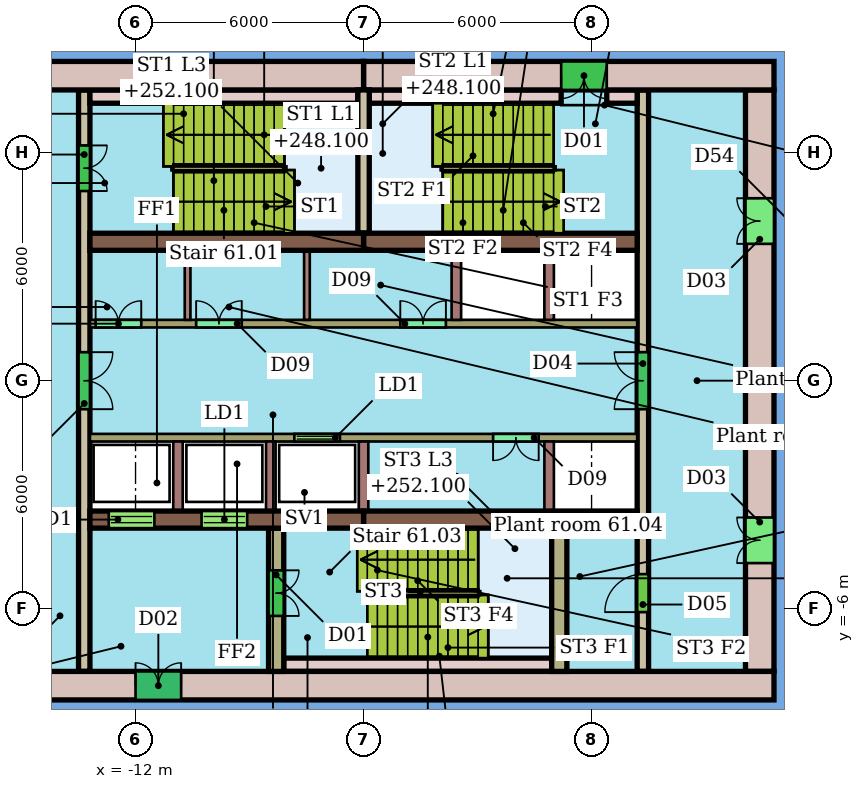
"""IFC4 building model, lengths in metres.
Left out: names, types, materials, properties, quantities, classifications, styles, units other than length and angle.
Written with IfcOpenShell. Run it as: python <this file> out.ifc"""

import sys

from ifc_helpers import new_model, si_unit, direction, frame, frame_2d, origin, place, context, subcontext, project, spatial, rectangle, extrude, element, fill, save


model = new_model("IFC4")
c1 = context("Model", 3, precision=1e-05, world=origin(), true_north=direction((0.0, 1.0)))
c2 = subcontext(c1, "Body", "Model", "MODEL_VIEW")
j1 = project(units=[si_unit("LENGTHUNIT", "METRE"), si_unit("PLANEANGLEUNIT", "RADIAN")], contexts=[c1])
p1 = place(None, origin())
s1 = spatial("IfcSite", under=j1, at=p1, CompositionType="ELEMENT")
p2 = place(p1, origin())
s2 = spatial("IfcBuilding", under=s1, at=p2, CompositionType="ELEMENT")
p3 = place(p2, frame((0.0, 0.0, 246.1)))
s3 = spatial("IfcBuildingStorey", under=s2, at=p3, CompositionType="ELEMENT", Elevation=246.1)
p4 = place(p3, frame((4.8, 8.025, 0.0), z_axis=(0.0, 0.0, 1.0), x_axis=(-1.0, 0.0, 0.0)))
e1 = element("IfcWall", 1, at=p4, inside=s3, PredefinedType="SHEAR", context=c2, shape_type="SweptSolid", body=[
    extrude(rectangle(XDim=10.8, YDim=0.75, at=frame_2d((5.4, 0.0))), origin(), (0.0, 0.0, 1.0), 7.55),
])
p5 = place(p4, frame((4.4, 0.0, 0.0)))
e2 = element("IfcOpeningElement", 2, at=p5, cuts=e1, PredefinedType="OPENING", context=c2, shape_type="SweptSolid", body=[
    extrude(rectangle(XDim=1.2, YDim=2.1, at=frame_2d((0.6, 1.05))), frame((0.0, 0.385, 0.0), z_axis=(0.0, -1.0, 0.0), x_axis=(1.0, 0.0, 0.0)), (0.0, 0.0, 1.0), 0.77),
])
p6 = place(p3, frame((-6.0, 8.025, 0.0), z_axis=(0.0, 0.0, 1.0), x_axis=(-1.0, 0.0, 0.0)))
e3 = element("IfcWall", 3, at=p6, inside=s3, PredefinedType="SHEAR", context=c2, shape_type="SweptSolid", body=[
    extrude(rectangle(XDim=10.8, YDim=0.75, at=frame_2d((5.4, 0.0))), origin(), (0.0, 0.0, 1.0), 7.55),
])
p7 = place(p3, frame((-16.8, -8.025, 0.0), z_axis=(0.0, 0.0, 1.0), x_axis=(1.0, 0.0, 0.0)))
e4 = element("IfcWall", 4, at=p7, inside=s3, PredefinedType="SHEAR", context=c2, shape_type="SweptSolid", body=[
    extrude(rectangle(XDim=21.6, YDim=0.75, at=frame_2d((10.8, 0.0))), origin(), (0.0, 0.0, 1.0), 7.55),
])
p8 = place(p7, frame((4.8, 0.0, 0.0)))
e5 = element("IfcOpeningElement", 5, at=p8, cuts=e4, PredefinedType="OPENING", context=c2, shape_type="SweptSolid", body=[
    extrude(rectangle(XDim=1.2, YDim=2.1, at=frame_2d((0.6, 1.05))), frame((0.0, 0.385, 0.0), z_axis=(0.0, -1.0, 0.0), x_axis=(1.0, 0.0, 0.0)), (0.0, 0.0, 1.0), 0.77),
])
p9 = place(p3, frame((4.425, -7.65, 0.0), z_axis=(0.0, 0.0, 1.0), x_axis=(0.0, 1.0, 0.0)))
e6 = element("IfcWall", 6, at=p9, inside=s3, PredefinedType="SHEAR", context=c2, shape_type="SweptSolid", body=[
    extrude(rectangle(XDim=15.3, YDim=0.75, at=frame_2d((7.65, 0.0))), origin(), (0.0, 0.0, 1.0), 7.55),
])
p10 = place(p9, frame((2.85, 0.0, 0.0)))
e7 = element("IfcOpeningElement", 7, at=p10, cuts=e6, PredefinedType="OPENING", context=c2, shape_type="SweptSolid", body=[
    extrude(rectangle(XDim=1.2, YDim=2.1, at=frame_2d((0.6, 1.05))), frame((0.0, 0.385, 0.0), z_axis=(0.0, -1.0, 0.0), x_axis=(1.0, 0.0, 0.0)), (0.0, 0.0, 1.0), 0.77),
])
p11 = place(p9, frame((11.25, 0.0, 0.0)))
e8 = element("IfcOpeningElement", 8, at=p11, cuts=e6, PredefinedType="OPENING", context=c2, shape_type="SweptSolid", body=[
    extrude(rectangle(XDim=1.2, YDim=2.1, at=frame_2d((0.6, 1.05))), frame((0.0, 0.385, 0.0), z_axis=(0.0, -1.0, 0.0), x_axis=(1.0, 0.0, 0.0)), (0.0, 0.0, 1.0), 0.77),
])
for number, where, z_axis, x_axis in (
    (9, (-13.2, 3.655, 0.0), (0.0, 0.0, 1.0), (1.0, 0.0, 0.0)),
    (10, (-6.0, 3.655, 0.0), (0.0, 0.0, 1.0), (1.0, 0.0, 0.0)),
):
    element("IfcWall", number, at=place(p3, frame(where, z_axis=z_axis, x_axis=x_axis)), inside=s3, PredefinedType="SHEAR", context=c2, shape_type="SweptSolid", body=[
        extrude(rectangle(XDim=7.2, YDim=0.45, at=frame_2d((3.6, 0.0))), origin(), (0.0, 0.0, 1.0), 7.55),
    ])
p12 = place(p3, frame((-13.2, -3.655, 0.0), z_axis=(0.0, 0.0, 1.0), x_axis=(1.0, 0.0, 0.0)))
e11 = element("IfcWall", 11, at=p12, inside=s3, PredefinedType="SHEAR", context=c2, shape_type="SweptSolid", body=[
    extrude(rectangle(XDim=7.2, YDim=0.45, at=frame_2d((3.6, 0.0))), origin(), (0.0, 0.0, 1.0), 7.55),
])
p13 = place(p12, frame((0.496, 0.0, 0.0)))
e12 = element("IfcOpeningElement", 12, at=p13, cuts=e11, PredefinedType="OPENING", context=c2, shape_type="SweptSolid", body=[
    extrude(rectangle(XDim=1.2, YDim=2.1, at=frame_2d((0.6, 1.05))), frame((0.0, 0.235, 0.0), z_axis=(0.0, -1.0, 0.0), x_axis=(1.0, 0.0, 0.0)), (0.0, 0.0, 1.0), 0.47),
])
p14 = place(p12, frame((2.938, 0.0, 0.0)))
e13 = element("IfcOpeningElement", 13, at=p14, cuts=e11, PredefinedType="OPENING", context=c2, shape_type="SweptSolid", body=[
    extrude(rectangle(XDim=1.2, YDim=2.1, at=frame_2d((0.6, 1.05))), frame((0.0, 0.235, 0.0), z_axis=(0.0, -1.0, 0.0), x_axis=(1.0, 0.0, 0.0)), (0.0, 0.0, 1.0), 0.47),
])
p15 = place(p3, frame((-6.0, -3.655, 0.0), z_axis=(0.0, 0.0, 1.0), x_axis=(1.0, 0.0, 0.0)))
e14 = element("IfcWall", 14, at=p15, inside=s3, PredefinedType="SHEAR", context=c2, shape_type="SweptSolid", body=[
    extrude(rectangle(XDim=7.2, YDim=0.45, at=frame_2d((3.6, 0.0))), origin(), (0.0, 0.0, 1.0), 7.55),
])
p16 = place(p3, frame((-13.35, 7.65, 0.0), z_axis=(0.0, 0.0, 1.0), x_axis=(0.0, -1.0, 0.0)))
e15 = element("IfcWall", 15, at=p16, inside=s3, PredefinedType="SHEAR", context=c2, shape_type="SweptSolid", body=[
    extrude(rectangle(XDim=15.3, YDim=0.3, at=frame_2d((7.65, 0.0))), origin(), (0.0, 0.0, 1.0), 7.55),
])
p17 = place(p16, frame((1.46, 0.0, 0.0)))
e16 = element("IfcOpeningElement", 16, at=p17, cuts=e15, PredefinedType="OPENING", context=c2, shape_type="SweptSolid", body=[
    extrude(rectangle(XDim=1.2, YDim=2.1, at=frame_2d((0.6, 1.05))), frame((0.0, 0.16, 0.0), z_axis=(0.0, -1.0, 0.0), x_axis=(1.0, 0.0, 0.0)), (0.0, 0.0, 1.0), 0.32),
])
p18 = place(p16, frame((6.9, 0.0, 0.0)))
e17 = element("IfcOpeningElement", 17, at=p18, cuts=e15, PredefinedType="OPENING", context=c2, shape_type="SweptSolid", body=[
    extrude(rectangle(XDim=1.5, YDim=2.1, at=frame_2d((0.75, 1.05))), frame((0.0, 0.16, 0.0), z_axis=(0.0, -1.0, 0.0), x_axis=(1.0, 0.0, 0.0)), (0.0, 0.0, 1.0), 0.32),
])
p19 = place(p3, frame((1.35, -7.65, 0.0), z_axis=(0.0, 0.0, 1.0), x_axis=(0.0, 1.0, 0.0)))
e18 = element("IfcWall", 18, at=p19, inside=s3, PredefinedType="SHEAR", context=c2, shape_type="SweptSolid", body=[
    extrude(rectangle(XDim=15.3, YDim=0.3, at=frame_2d((7.65, 0.0))), origin(), (0.0, 0.0, 1.0), 7.55),
])
p20 = place(p19, frame((1.56, 0.0, 0.0)))
e19 = element("IfcOpeningElement", 19, at=p20, cuts=e18, PredefinedType="OPENING", context=c2, shape_type="SweptSolid", body=[
    extrude(rectangle(XDim=1.0, YDim=2.1, at=frame_2d((0.5, 1.05))), frame((0.0, 0.16, 0.0), z_axis=(0.0, -1.0, 0.0), x_axis=(1.0, 0.0, 0.0)), (0.0, 0.0, 1.0), 0.32),
])
p21 = place(p19, frame((6.9, 0.0, 0.0)))
e20 = element("IfcOpeningElement", 20, at=p21, cuts=e18, PredefinedType="OPENING", context=c2, shape_type="SweptSolid", body=[
    extrude(rectangle(XDim=1.5, YDim=2.1, at=frame_2d((0.75, 1.05))), frame((0.0, 0.16, 0.0), z_axis=(0.0, -1.0, 0.0), x_axis=(1.0, 0.0, 0.0)), (0.0, 0.0, 1.0), 0.32),
])
p22 = place(p3, frame((-13.2, 1.5, 0.0), z_axis=(0.0, 0.0, 1.0), x_axis=(1.0, 0.0, 0.0)))
e21 = element("IfcWall", 21, at=p22, inside=s3, PredefinedType="SHEAR", context=c2, shape_type="SweptSolid", body=[
    extrude(rectangle(XDim=14.4, YDim=0.2, at=frame_2d((7.2, 0.0))), origin(), (0.0, 0.0, 1.0), 7.55),
])
p23 = place(p22, frame((0.15, 0.0, 0.0)))
e22 = element("IfcOpeningElement", 22, at=p23, cuts=e21, PredefinedType="OPENING", context=c2, shape_type="SweptSolid", body=[
    extrude(rectangle(XDim=1.2, YDim=2.4, at=frame_2d((0.6, 1.2))), frame((0.0, 0.11, 0.0), z_axis=(0.0, -1.0, 0.0), x_axis=(1.0, 0.0, 0.0)), (0.0, 0.0, 1.0), 0.22),
])
p24 = place(p22, frame((2.794, 0.0, 0.0)))
e23 = element("IfcOpeningElement", 23, at=p24, cuts=e21, PredefinedType="OPENING", context=c2, shape_type="SweptSolid", body=[
    extrude(rectangle(XDim=1.2, YDim=2.4, at=frame_2d((0.6, 1.2))), frame((0.0, 0.11, 0.0), z_axis=(0.0, -1.0, 0.0), x_axis=(1.0, 0.0, 0.0)), (0.0, 0.0, 1.0), 0.22),
])
p25 = place(p22, frame((8.167, 0.0, 0.0)))
e24 = element("IfcOpeningElement", 24, at=p25, cuts=e21, PredefinedType="OPENING", context=c2, shape_type="SweptSolid", body=[
    extrude(rectangle(XDim=1.2, YDim=2.4, at=frame_2d((0.6, 1.2))), frame((0.0, 0.11, 0.0), z_axis=(0.0, -1.0, 0.0), x_axis=(1.0, 0.0, 0.0)), (0.0, 0.0, 1.0), 0.22),
])
p26 = place(p3, frame((1.2, -1.5, 0.0), z_axis=(0.0, 0.0, 1.0), x_axis=(-1.0, 0.0, 0.0)))
e25 = element("IfcWall", 25, at=p26, inside=s3, PredefinedType="SHEAR", context=c2, shape_type="SweptSolid", body=[
    extrude(rectangle(XDim=14.4, YDim=0.2, at=frame_2d((7.2, 0.0))), origin(), (0.0, 0.0, 1.0), 7.55),
])
p27 = place(p26, frame((7.821, 0.0, 0.0)))
e26 = element("IfcOpeningElement", 26, at=p27, cuts=e25, PredefinedType="OPENING", context=c2, shape_type="SweptSolid", body=[
    extrude(rectangle(XDim=1.2, YDim=2.1, at=frame_2d((0.6, 1.05))), frame((0.0, 0.11, 0.0), z_axis=(0.0, -1.0, 0.0), x_axis=(1.0, 0.0, 0.0)), (0.0, 0.0, 1.0), 0.22),
])
p28 = place(p26, frame((2.592, 0.0, 0.0)))
e27 = element("IfcOpeningElement", 27, at=p28, cuts=e25, PredefinedType="OPENING", context=c2, shape_type="SweptSolid", body=[
    extrude(rectangle(XDim=1.2, YDim=2.4, at=frame_2d((0.6, 1.2))), frame((0.0, 0.11, 0.0), z_axis=(0.0, -1.0, 0.0), x_axis=(1.0, 0.0, 0.0)), (0.0, 0.0, 1.0), 0.22),
])
p29 = place(p3, frame((-8.3, -3.88, 0.0), z_axis=(0.0, 0.0, 1.0), x_axis=(0.0, -1.0, 0.0)))
e28 = element("IfcWall", 28, at=p29, inside=s3, PredefinedType="SHEAR", context=c2, shape_type="SweptSolid", body=[
    extrude(rectangle(XDim=3.77, YDim=0.4, at=frame_2d((1.885, 0.0))), origin(), (0.0, 0.0, 1.0), 7.55),
])
p30 = place(p29, frame((1.11, 0.0, 0.0)))
e29 = element("IfcOpeningElement", 29, at=p30, cuts=e28, PredefinedType="OPENING", context=c2, shape_type="SweptSolid", body=[
    extrude(rectangle(XDim=1.2, YDim=2.1, at=frame_2d((0.6, 1.05))), frame((0.0, 0.21, 0.0), z_axis=(0.0, -1.0, 0.0), x_axis=(1.0, 0.0, 0.0)), (0.0, 0.0, 1.0), 0.42),
])
p31 = place(p3, frame((-0.85, -3.88, 0.0), z_axis=(0.0, 0.0, 1.0), x_axis=(0.0, -1.0, 0.0)))
e30 = element("IfcWall", 30, at=p31, inside=s3, PredefinedType="SHEAR", context=c2, shape_type="SweptSolid", body=[
    extrude(rectangle(XDim=3.77, YDim=0.4, at=frame_2d((1.885, 0.0))), origin(), (0.0, 0.0, 1.0), 7.55),
])
p32 = place(p3, frame((-6.0, 3.88, 0.0), z_axis=(0.0, 0.0, 1.0), x_axis=(0.0, 1.0, 0.0)))
e31 = element("IfcWall", 31, at=p32, inside=s3, PredefinedType="SHEAR", context=c2, shape_type="SweptSolid", body=[
    extrude(rectangle(XDim=3.77, YDim=0.3, at=frame_2d((1.885, 0.0))), origin(), (0.0, 0.0, 1.0), 7.55),
])
p33 = place(p3, frame((-13.2, 7.475, 0.0), z_axis=(0.0, 0.0, 1.0), x_axis=(1.0, 0.0, 0.0)))
e32 = element("IfcWall", 32, at=p33, inside=s3, PredefinedType="SHEAR", context=c2, shape_type="SweptSolid", body=[
    extrude(rectangle(XDim=7.05, YDim=0.35, at=frame_2d((3.525, 0.0))), origin(), (0.0, 0.0, 1.0), 7.55),
])
p34 = place(p3, frame((-5.85, 7.475, 0.0), z_axis=(0.0, 0.0, 1.0), x_axis=(1.0, 0.0, 0.0)))
e33 = element("IfcWall", 33, at=p34, inside=s3, PredefinedType="SHEAR", context=c2, shape_type="SweptSolid", body=[
    extrude(rectangle(XDim=5.05, YDim=0.35, at=frame_2d((2.525, 0.0))), origin(), (0.0, 0.0, 1.0), 7.55),
])
p35 = place(p3, frame((0.4, 7.475, 0.0), z_axis=(0.0, 0.0, 1.0), x_axis=(1.0, 0.0, 0.0)))
e34 = element("IfcWall", 34, at=p35, inside=s3, PredefinedType="SHEAR", context=c2, shape_type="SweptSolid", body=[
    extrude(rectangle(XDim=0.8, YDim=0.35, at=frame_2d((0.4, 0.0))), origin(), (0.0, 0.0, 1.0), 7.55),
])
p36 = place(p3, frame((-8.1, -7.475, 0.0), z_axis=(0.0, 0.0, 1.0), x_axis=(1.0, 0.0, 0.0)))
e35 = element("IfcWall", 35, at=p36, inside=s3, PredefinedType="SHEAR", context=c2, shape_type="SweptSolid", body=[
    extrude(rectangle(XDim=7.05, YDim=0.35, at=frame_2d((3.525, 0.0))), origin(), (0.0, 0.0, 1.0), 7.55),
])
for number, where, z_axis, x_axis in (
    (36, (-3.558, 1.6, 0.0), (0.0, 0.0, 1.0), (0.0, 1.0, 0.0)),
    (37, (-1.117, 1.6, 0.0), (0.0, 0.0, 1.0), (0.0, 1.0, 0.0)),
):
    element("IfcWall", number, at=place(p3, frame(where, z_axis=z_axis, x_axis=x_axis)), inside=s3, PredefinedType="SHEAR", context=c2, shape_type="SweptSolid", body=[
        extrude(rectangle(XDim=1.83, YDim=0.25, at=frame_2d((0.915, 0.0))), origin(), (0.0, 0.0, 1.0), 7.55),
    ])
for number, where, z_axis, x_axis in (
    (38, (-10.631, 1.6, 0.0), (0.0, 0.0, 1.0), (0.0, 1.0, 0.0)),
    (39, (-7.49, 1.6, 0.0), (0.0, 0.0, 1.0), (0.0, 1.0, 0.0)),
):
    element("IfcWall", number, at=place(p3, frame(where, z_axis=z_axis, x_axis=x_axis)), inside=s3, PredefinedType="PARTITIONING", context=c2, shape_type="SweptSolid", body=[
        extrude(rectangle(XDim=1.83, YDim=0.15, at=frame_2d((0.915, 0.0))), origin(), (0.0, 0.0, 1.0), 7.55),
    ])
for number, where, z_axis, x_axis in (
    (40, (-10.883, -1.6, 0.0), (0.0, 0.0, 1.0), (0.0, -1.0, 0.0)),
    (41, (-8.442, -1.6, 0.0), (0.0, 0.0, 1.0), (0.0, -1.0, 0.0)),
    (42, (-6.0, -1.6, 0.0), (0.0, 0.0, 1.0), (0.0, -1.0, 0.0)),
    (43, (-1.117, -1.6, 0.0), (0.0, 0.0, 1.0), (0.0, -1.0, 0.0)),
):
    element("IfcWall", number, at=place(p3, frame(where, z_axis=z_axis, x_axis=x_axis)), inside=s3, PredefinedType="SHEAR", context=c2, shape_type="SweptSolid", body=[
        extrude(rectangle(XDim=1.83, YDim=0.25, at=frame_2d((0.915, 0.0))), origin(), (0.0, 0.0, 1.0), 7.55),
    ])
p37 = place(p5, origin())
e44 = element("IfcDoor", 44, at=p37, inside=s3, OperationType="DOUBLE_DOOR_SINGLE_SWING", PredefinedType="NOTDEFINED", context=c2, shape_type="SweptSolid", body=[
    extrude(rectangle(XDim=1.2, YDim=2.1, at=frame_2d((0.6, 1.05))), frame((0.0, 0.025, 0.0), z_axis=(0.0, -1.0, 0.0), x_axis=(1.0, 0.0, 0.0)), (0.0, 0.0, 1.0), 0.05),
])
fill(e2, e44)
p38 = place(p8, origin())
e45 = element("IfcDoor", 45, at=p38, inside=s3, OperationType="DOUBLE_DOOR_SINGLE_SWING", PredefinedType="NOTDEFINED", context=c2, shape_type="SweptSolid", body=[
    extrude(rectangle(XDim=1.2, YDim=2.1, at=frame_2d((0.6, 1.05))), frame((0.0, 0.025, 0.0), z_axis=(0.0, -1.0, 0.0), x_axis=(1.0, 0.0, 0.0)), (0.0, 0.0, 1.0), 0.05),
])
fill(e5, e45)
p39 = place(p10, origin())
e46 = element("IfcDoor", 46, at=p39, inside=s3, OperationType="DOUBLE_DOOR_SINGLE_SWING", PredefinedType="NOTDEFINED", context=c2, shape_type="SweptSolid", body=[
    extrude(rectangle(XDim=1.2, YDim=2.1, at=frame_2d((0.6, 1.05))), frame((0.0, 0.025, 0.0), z_axis=(0.0, -1.0, 0.0), x_axis=(1.0, 0.0, 0.0)), (0.0, 0.0, 1.0), 0.05),
])
fill(e7, e46)
p40 = place(p11, origin())
e47 = element("IfcDoor", 47, at=p40, inside=s3, OperationType="DOUBLE_DOOR_SINGLE_SWING", PredefinedType="NOTDEFINED", context=c2, shape_type="SweptSolid", body=[
    extrude(rectangle(XDim=1.2, YDim=2.1, at=frame_2d((0.6, 1.05))), frame((0.0, 0.025, 0.0), z_axis=(0.0, -1.0, 0.0), x_axis=(1.0, 0.0, 0.0)), (0.0, 0.0, 1.0), 0.05),
])
fill(e8, e47)
p41 = place(p13, origin())
e48 = element("IfcDoor", 48, at=p41, inside=s3, OperationType="DOUBLE_DOOR_SLIDING", PredefinedType="NOTDEFINED", context=c2, shape_type="SweptSolid", body=[
    extrude(rectangle(XDim=1.2, YDim=2.1, at=frame_2d((0.6, 1.05))), frame((0.0, 0.025, 0.0), z_axis=(0.0, -1.0, 0.0), x_axis=(1.0, 0.0, 0.0)), (0.0, 0.0, 1.0), 0.05),
])
fill(e12, e48)
p42 = place(p14, origin())
e49 = element("IfcDoor", 49, at=p42, inside=s3, OperationType="DOUBLE_DOOR_SLIDING", PredefinedType="NOTDEFINED", context=c2, shape_type="SweptSolid", body=[
    extrude(rectangle(XDim=1.2, YDim=2.1, at=frame_2d((0.6, 1.05))), frame((0.0, 0.025, 0.0), z_axis=(0.0, -1.0, 0.0), x_axis=(1.0, 0.0, 0.0)), (0.0, 0.0, 1.0), 0.05),
])
fill(e13, e49)
p43 = place(p17, origin())
e50 = element("IfcDoor", 50, at=p43, inside=s3, OperationType="DOUBLE_DOOR_SINGLE_SWING", PredefinedType="NOTDEFINED", context=c2, shape_type="SweptSolid", body=[
    extrude(rectangle(XDim=1.2, YDim=2.1, at=frame_2d((0.6, 1.05))), frame((0.0, 0.025, 0.0), z_axis=(0.0, -1.0, 0.0), x_axis=(1.0, 0.0, 0.0)), (0.0, 0.0, 1.0), 0.05),
])
fill(e16, e50)
p44 = place(p18, origin())
e51 = element("IfcDoor", 51, at=p44, inside=s3, OperationType="DOUBLE_DOOR_SINGLE_SWING", PredefinedType="NOTDEFINED", context=c2, shape_type="SweptSolid", body=[
    extrude(rectangle(XDim=1.5, YDim=2.1, at=frame_2d((0.75, 1.05))), frame((0.0, 0.025, 0.0), z_axis=(0.0, -1.0, 0.0), x_axis=(1.0, 0.0, 0.0)), (0.0, 0.0, 1.0), 0.05),
])
fill(e17, e51)
p45 = place(p20, origin())
e52 = element("IfcDoor", 52, at=p45, inside=s3, OperationType="SINGLE_SWING_LEFT", PredefinedType="NOTDEFINED", context=c2, shape_type="SweptSolid", body=[
    extrude(rectangle(XDim=1.0, YDim=2.1, at=frame_2d((0.5, 1.05))), frame((0.0, 0.025, 0.0), z_axis=(0.0, -1.0, 0.0), x_axis=(1.0, 0.0, 0.0)), (0.0, 0.0, 1.0), 0.05),
])
fill(e19, e52)
p46 = place(p21, origin())
e53 = element("IfcDoor", 53, at=p46, inside=s3, OperationType="DOUBLE_DOOR_SINGLE_SWING", PredefinedType="NOTDEFINED", context=c2, shape_type="SweptSolid", body=[
    extrude(rectangle(XDim=1.5, YDim=2.1, at=frame_2d((0.75, 1.05))), frame((0.0, 0.025, 0.0), z_axis=(0.0, -1.0, 0.0), x_axis=(1.0, 0.0, 0.0)), (0.0, 0.0, 1.0), 0.05),
])
fill(e20, e53)
p47 = place(p23, origin())
e54 = element("IfcDoor", 54, at=p47, inside=s3, OperationType="DOUBLE_DOOR_SINGLE_SWING", PredefinedType="NOTDEFINED", context=c2, shape_type="SweptSolid", body=[
    extrude(rectangle(XDim=1.2, YDim=2.4, at=frame_2d((0.6, 1.2))), frame((0.0, 0.025, 0.0), z_axis=(0.0, -1.0, 0.0), x_axis=(1.0, 0.0, 0.0)), (0.0, 0.0, 1.0), 0.05),
])
fill(e22, e54)
p48 = place(p24, origin())
e55 = element("IfcDoor", 55, at=p48, inside=s3, OperationType="DOUBLE_DOOR_SINGLE_SWING", PredefinedType="NOTDEFINED", context=c2, shape_type="SweptSolid", body=[
    extrude(rectangle(XDim=1.2, YDim=2.4, at=frame_2d((0.6, 1.2))), frame((0.0, 0.025, 0.0), z_axis=(0.0, -1.0, 0.0), x_axis=(1.0, 0.0, 0.0)), (0.0, 0.0, 1.0), 0.05),
])
fill(e23, e55)
p49 = place(p25, origin())
e56 = element("IfcDoor", 56, at=p49, inside=s3, OperationType="DOUBLE_DOOR_SINGLE_SWING", PredefinedType="NOTDEFINED", context=c2, shape_type="SweptSolid", body=[
    extrude(rectangle(XDim=1.2, YDim=2.4, at=frame_2d((0.6, 1.2))), frame((0.0, 0.025, 0.0), z_axis=(0.0, -1.0, 0.0), x_axis=(1.0, 0.0, 0.0)), (0.0, 0.0, 1.0), 0.05),
])
fill(e24, e56)
p50 = place(p27, origin())
e57 = element("IfcDoor", 57, at=p50, inside=s3, OperationType="DOUBLE_DOOR_SLIDING", PredefinedType="NOTDEFINED", context=c2, shape_type="SweptSolid", body=[
    extrude(rectangle(XDim=1.2, YDim=2.1, at=frame_2d((0.6, 1.05))), frame((0.0, 0.025, 0.0), z_axis=(0.0, -1.0, 0.0), x_axis=(1.0, 0.0, 0.0)), (0.0, 0.0, 1.0), 0.05),
])
fill(e26, e57)
p51 = place(p28, origin())
e58 = element("IfcDoor", 58, at=p51, inside=s3, OperationType="DOUBLE_DOOR_SINGLE_SWING", PredefinedType="NOTDEFINED", context=c2, shape_type="SweptSolid", body=[
    extrude(rectangle(XDim=1.2, YDim=2.4, at=frame_2d((0.6, 1.2))), frame((0.0, 0.025, 0.0), z_axis=(0.0, -1.0, 0.0), x_axis=(1.0, 0.0, 0.0)), (0.0, 0.0, 1.0), 0.05),
])
fill(e27, e58)
p52 = place(p30, origin())
e59 = element("IfcDoor", 59, at=p52, inside=s3, OperationType="DOUBLE_DOOR_SINGLE_SWING", PredefinedType="NOTDEFINED", context=c2, shape_type="SweptSolid", body=[
    extrude(rectangle(XDim=1.2, YDim=2.1, at=frame_2d((0.6, 1.05))), frame((0.0, 0.025, 0.0), z_axis=(0.0, -1.0, 0.0), x_axis=(1.0, 0.0, 0.0)), (0.0, 0.0, 1.0), 0.05),
])
fill(e29, e59)
save(model, sys.argv[1])
